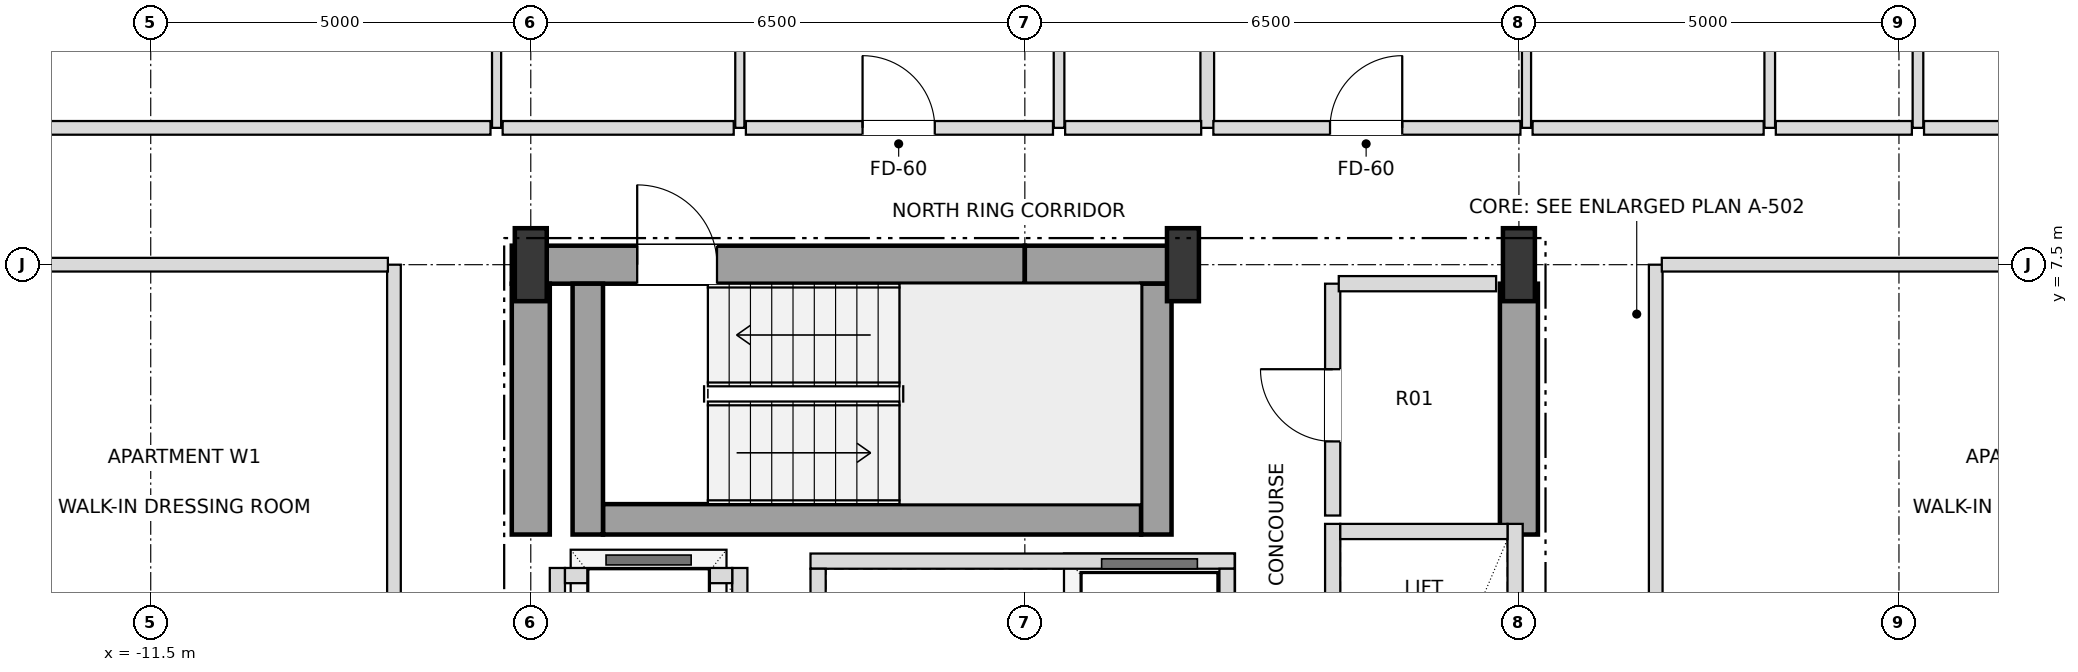
"""IFC4 building model, lengths in metres.
Left out: names, types, materials, properties, quantities, classifications, styles, units other than length and angle.
Written with IfcOpenShell. Run it as: python <this file> out.ifc"""

import sys

from ifc_helpers import new_model, si_unit, direction, frame, frame_2d, origin, origin_2d, place, context, subcontext, project, spatial, rectangle, i_section, extrude, element, fill, save


model = new_model("IFC4")
c1 = context("Model", 3, precision=1e-05, world=origin(), true_north=direction((0.0, 1.0)))
c2 = subcontext(c1, "Body", "Model", "MODEL_VIEW")
j1 = project(units=[si_unit("LENGTHUNIT", "METRE"), si_unit("PLANEANGLEUNIT", "RADIAN")], contexts=[c1])
p1 = place(None, origin())
s1 = spatial("IfcSite", under=j1, at=p1, CompositionType="ELEMENT")
p2 = place(p1, origin())
s2 = spatial("IfcBuilding", under=s1, at=p2, CompositionType="ELEMENT")
p3 = place(p2, frame((0.0, 0.0, 64.8)))
s3 = spatial("IfcBuildingStorey", under=s2, at=p3, CompositionType="ELEMENT", Elevation=64.8)
for number, where, z_axis, x_axis in (
    (1, (-6.5, 7.5, 0.0), (0.0, 0.0, 1.0), (1.0, 0.0, 0.0)),
    (2, (2.08, 7.5, 0.0), (0.0, 0.0, 1.0), (1.0, 0.0, 0.0)),
    (3, (6.5, 7.5, 0.0), (0.0, 0.0, 1.0), (1.0, 0.0, 0.0)),
):
    element("IfcColumn", number, at=place(p3, frame(where, z_axis=z_axis, x_axis=x_axis)), inside=s3, PredefinedType="COLUMN", context=c2, shape_type="SweptSolid", body=[
        extrude(i_section(OverallWidth=0.42, OverallDepth=0.96, WebThickness=0.022, FlangeThickness=0.034, at=origin_2d()), origin(), (0.0, 0.0, 1.0), 3.6),
    ])
p4 = place(p3, frame((-6.75, 7.5, 0.0), z_axis=(0.0, 0.0, 1.0), x_axis=(1.0, 0.0, 0.0)))
e4 = element("IfcWall", 4, at=p4, inside=s3, PredefinedType="SHEAR", context=c2, shape_type="SweptSolid", body=[
    extrude(rectangle(XDim=6.75, YDim=0.5, at=frame_2d((3.375, 0.0))), origin(), (0.0, 0.0, 1.0), 3.38),
])
p5 = place(p4, frame((1.65, 0.0, 0.0)))
e5 = element("IfcOpeningElement", 5, at=p5, cuts=e4, PredefinedType="OPENING", context=c2, shape_type="SweptSolid", body=[
    extrude(rectangle(XDim=1.05, YDim=2.15, at=frame_2d((0.525, 1.075))), frame((0.0, 0.26, 0.0), z_axis=(0.0, -1.0, 0.0), x_axis=(1.0, 0.0, 0.0)), (0.0, 0.0, 1.0), 0.52),
])
p6 = place(p3, frame((0.0, 7.5, 0.0), z_axis=(0.0, 0.0, 1.0), x_axis=(1.0, 0.0, 0.0)))
e6 = element("IfcWall", 6, at=p6, inside=s3, PredefinedType="SHEAR", context=c2, shape_type="SweptSolid", body=[
    extrude(rectangle(XDim=2.08, YDim=0.5, at=frame_2d((1.04, 0.0))), origin(), (0.0, 0.0, 1.0), 3.38),
])
for number, where, z_axis, x_axis in (
    (7, (-6.5, 3.95, 0.0), (0.0, 0.0, 1.0), (0.0, 1.0, 0.0)),
    (8, (6.5, 3.95, 0.0), (0.0, 0.0, 1.0), (0.0, 1.0, 0.0)),
):
    element("IfcWall", number, at=place(p3, frame(where, z_axis=z_axis, x_axis=x_axis)), inside=s3, PredefinedType="SHEAR", context=c2, shape_type="SweptSolid", body=[
        extrude(rectangle(XDim=3.3, YDim=0.5, at=frame_2d((1.65, 0.0))), origin(), (0.0, 0.0, 1.0), 3.38),
    ])
p7 = place(p3, frame((-5.55, 4.15, 0.0), z_axis=(0.0, 0.0, 1.0), x_axis=(1.0, 0.0, 0.0)))
e9 = element("IfcWall", 9, at=p7, inside=s3, PredefinedType="SHEAR", context=c2, shape_type="SweptSolid", body=[
    extrude(rectangle(XDim=7.08, YDim=0.4, at=frame_2d((3.54, 0.0))), origin(), (0.0, 0.0, 1.0), 3.38),
])
for number, where, z_axis, x_axis in (
    (10, (1.73, 3.95, 0.0), (0.0, 0.0, 1.0), (0.0, 1.0, 0.0)),
    (11, (-5.75, 3.95, 0.0), (0.0, 0.0, 1.0), (0.0, 1.0, 0.0)),
):
    element("IfcWall", number, at=place(p3, frame(where, z_axis=z_axis, x_axis=x_axis)), inside=s3, PredefinedType="SHEAR", context=c2, shape_type="SweptSolid", body=[
        extrude(rectangle(XDim=3.3, YDim=0.4, at=frame_2d((1.65, 0.0))), origin(), (0.0, 0.0, 1.0), 3.38),
    ])
p8 = place(p3, frame((-3.75, -3.51, 0.0), z_axis=(0.0, 0.0, 1.0), x_axis=(0.0, 1.0, 0.0)))
e12 = element("IfcWall", 12, at=p8, inside=s3, PredefinedType="SOLIDWALL", context=c2, shape_type="SweptSolid", body=[
    extrude(rectangle(XDim=7.02, YDim=0.2, at=frame_2d((3.51, 0.0))), origin(), (0.0, 0.0, 1.0), 3.38),
])
p9 = place(p8, frame((0.51, 0.0, 0.0)))
e13 = element("IfcOpeningElement", 13, at=p9, cuts=e12, PredefinedType="OPENING", context=c2, shape_type="SweptSolid", body=[
    extrude(rectangle(XDim=1.1, YDim=2.15, at=frame_2d((0.55, 1.075))), frame((0.0, 0.11, 0.0), z_axis=(0.0, -1.0, 0.0), x_axis=(1.0, 0.0, 0.0)), (0.0, 0.0, 1.0), 0.22),
])
p10 = place(p8, frame((2.96, 0.0, 0.0)))
e14 = element("IfcOpeningElement", 14, at=p10, cuts=e12, PredefinedType="OPENING", context=c2, shape_type="SweptSolid", body=[
    extrude(rectangle(XDim=1.1, YDim=2.15, at=frame_2d((0.55, 1.075))), frame((0.0, 0.11, 0.0), z_axis=(0.0, -1.0, 0.0), x_axis=(1.0, 0.0, 0.0)), (0.0, 0.0, 1.0), 0.22),
])
p11 = place(p8, frame((5.41, 0.0, 0.0)))
e15 = element("IfcOpeningElement", 15, at=p11, cuts=e12, PredefinedType="OPENING", context=c2, shape_type="SweptSolid", body=[
    extrude(rectangle(XDim=1.1, YDim=2.15, at=frame_2d((0.55, 1.075))), frame((0.0, 0.11, 0.0), z_axis=(0.0, -1.0, 0.0), x_axis=(1.0, 0.0, 0.0)), (0.0, 0.0, 1.0), 0.22),
])
p12 = place(p3, frame((-6.15, -3.51, 0.0), z_axis=(0.0, 0.0, 1.0), x_axis=(0.0, 1.0, 0.0)))
e16 = element("IfcWall", 16, at=p12, inside=s3, PredefinedType="SOLIDWALL", context=c2, shape_type="SweptSolid", body=[
    extrude(rectangle(XDim=7.02, YDim=0.2, at=frame_2d((3.51, 0.0))), origin(), (0.0, 0.0, 1.0), 3.38),
])
p13 = place(p3, frame((-6.05, 3.41, 0.0), z_axis=(0.0, 0.0, 1.0), x_axis=(1.0, 0.0, 0.0)))
e17 = element("IfcWall", 17, at=p13, inside=s3, PredefinedType="SOLIDWALL", context=c2, shape_type="SweptSolid", body=[
    extrude(rectangle(XDim=2.2, YDim=0.2, at=frame_2d((1.1, 0.0))), origin(), (0.0, 0.0, 1.0), 3.38),
])
p14 = place(p3, frame((4.05, -1.49, 0.0), z_axis=(0.0, 0.0, 1.0), x_axis=(0.0, 1.0, 0.0)))
e18 = element("IfcWall", 18, at=p14, inside=s3, PredefinedType="SOLIDWALL", context=c2, shape_type="SweptSolid", body=[
    extrude(rectangle(XDim=5.58, YDim=0.2, at=frame_2d((2.79, 0.0))), origin(), (0.0, 0.0, 1.0), 3.38),
])
p15 = place(p3, frame((6.45, -1.49, 0.0), z_axis=(0.0, 0.0, 1.0), x_axis=(0.0, 1.0, 0.0)))
e19 = element("IfcWall", 19, at=p15, inside=s3, PredefinedType="SOLIDWALL", context=c2, shape_type="SweptSolid", body=[
    extrude(rectangle(XDim=5.58, YDim=0.2, at=frame_2d((2.79, 0.0))), origin(), (0.0, 0.0, 1.0), 2.816),
])
p16 = place(p3, frame((4.15, 3.99, 0.0), z_axis=(0.0, 0.0, 1.0), x_axis=(1.0, 0.0, 0.0)))
e20 = element("IfcWall", 20, at=p16, inside=s3, PredefinedType="SOLIDWALL", context=c2, shape_type="SweptSolid", body=[
    extrude(rectangle(XDim=2.2, YDim=0.2, at=frame_2d((1.1, 0.0))), origin(), (0.0, 0.0, 1.0), 3.38),
])
p17 = place(p3, frame((-2.82, 3.6, 0.0), z_axis=(0.0, 0.0, 1.0), x_axis=(1.0, 0.0, 0.0)))
e21 = element("IfcWall", 21, at=p17, inside=s3, PredefinedType="SOLIDWALL", context=c2, shape_type="SweptSolid", body=[
    extrude(rectangle(XDim=5.58, YDim=0.2, at=frame_2d((2.79, 0.0))), origin(), (0.0, 0.0, 1.0), 3.38),
])
for number, where, z_axis, x_axis in (
    (22, (-2.72, 1.0, 0.0), (0.0, 0.0, 1.0), (0.0, 1.0, 0.0)),
    (23, (2.66, 1.0, 0.0), (0.0, 0.0, 1.0), (0.0, 1.0, 0.0)),
):
    element("IfcWall", number, at=place(p3, frame(where, z_axis=z_axis, x_axis=x_axis)), inside=s3, PredefinedType="SOLIDWALL", context=c2, shape_type="SweptSolid", body=[
        extrude(rectangle(XDim=2.5, YDim=0.2, at=frame_2d((1.25, 0.0))), origin(), (0.0, 0.0, 1.0), 3.38),
    ])
p18 = place(p3, frame((-8.3, -7.5, 0.0), z_axis=(0.0, 0.0, 1.0), x_axis=(0.0, 1.0, 0.0)))
e24 = element("IfcWall", 24, at=p18, inside=s3, PredefinedType="PARTITIONING", context=c2, shape_type="SweptSolid", body=[
    extrude(rectangle(XDim=15.0, YDim=0.18, at=frame_2d((7.5, 0.0))), origin(), (0.0, 0.0, 1.0), 3.38),
])
p19 = place(p18, frame((3.475, 0.0, 0.0)))
e25 = element("IfcOpeningElement", 25, at=p19, cuts=e24, PredefinedType="OPENING", context=c2, shape_type="SweptSolid", body=[
    extrude(rectangle(XDim=0.95, YDim=2.15, at=frame_2d((0.475, 1.075))), frame((0.0, 0.1, 0.0), z_axis=(0.0, -1.0, 0.0), x_axis=(1.0, 0.0, 0.0)), (0.0, 0.0, 1.0), 0.2),
])
p20 = place(p3, frame((-6.95, 9.3, 0.0), z_axis=(0.0, 0.0, 1.0), x_axis=(0.0, 1.0, 0.0)))
e26 = element("IfcWall", 26, at=p20, inside=s3, PredefinedType="PARTITIONING", context=c2, shape_type="SweptSolid", body=[
    extrude(rectangle(XDim=9.6, YDim=0.12, at=frame_2d((4.8, 0.0))), origin(), (0.0, 0.0, 1.0), 2.816),
])
p21 = place(p20, frame((4.35, 0.0, 0.0)))
e27 = element("IfcOpeningElement", 27, at=p21, cuts=e26, PredefinedType="OPENING", context=c2, shape_type="SweptSolid", body=[
    extrude(rectangle(XDim=0.9, YDim=2.1, at=frame_2d((0.45, 1.05))), frame((0.0, 0.07, 0.0), z_axis=(0.0, -1.0, 0.0), x_axis=(1.0, 0.0, 0.0)), (0.0, 0.0, 1.0), 0.14),
])
p22 = place(p3, frame((-3.75, 9.3, 0.0), z_axis=(0.0, 0.0, 1.0), x_axis=(0.0, 1.0, 0.0)))
e28 = element("IfcWall", 28, at=p22, inside=s3, PredefinedType="PARTITIONING", context=c2, shape_type="SweptSolid", body=[
    extrude(rectangle(XDim=15.6, YDim=0.12, at=frame_2d((7.8, 0.0))), origin(), (0.0, 0.0, 1.0), 2.816),
])
p23 = place(p22, frame((4.325, 0.0, 0.0)))
e29 = element("IfcOpeningElement", 29, at=p23, cuts=e28, PredefinedType="OPENING", context=c2, shape_type="SweptSolid", body=[
    extrude(rectangle(XDim=0.95, YDim=2.1, at=frame_2d((0.475, 1.05))), frame((0.0, 0.07, 0.0), z_axis=(0.0, -1.0, 0.0), x_axis=(1.0, 0.0, 0.0)), (0.0, 0.0, 1.0), 0.14),
])
p24 = place(p22, frame((12.15, 0.0, 0.0)))
e30 = element("IfcOpeningElement", 30, at=p24, cuts=e28, PredefinedType="OPENING", context=c2, shape_type="SweptSolid", body=[
    extrude(rectangle(XDim=0.9, YDim=2.1, at=frame_2d((0.45, 1.05))), frame((0.0, 0.07, 0.0), z_axis=(0.0, -1.0, 0.0), x_axis=(1.0, 0.0, 0.0)), (0.0, 0.0, 1.0), 0.14),
])
p25 = place(p3, frame((0.45, 9.3, 0.0), z_axis=(0.0, 0.0, 1.0), x_axis=(0.0, 1.0, 0.0)))
e31 = element("IfcWall", 31, at=p25, inside=s3, PredefinedType="PARTITIONING", context=c2, shape_type="SweptSolid", body=[
    extrude(rectangle(XDim=9.6, YDim=0.14, at=frame_2d((4.8, 0.0))), origin(), (0.0, 0.0, 1.0), 2.948),
])
p26 = place(p25, frame((4.35, 0.0, 0.0)))
e32 = element("IfcOpeningElement", 32, at=p26, cuts=e31, PredefinedType="OPENING", context=c2, shape_type="SweptSolid", body=[
    extrude(rectangle(XDim=0.9, YDim=2.1, at=frame_2d((0.45, 1.05))), frame((0.0, 0.08, 0.0), z_axis=(0.0, -1.0, 0.0), x_axis=(1.0, 0.0, 0.0)), (0.0, 0.0, 1.0), 0.16),
])
p27 = place(p3, frame((2.4, 9.3, 0.0), z_axis=(0.0, 0.0, 1.0), x_axis=(0.0, 1.0, 0.0)))
e33 = element("IfcWall", 33, at=p27, inside=s3, PredefinedType="PARTITIONING", context=c2, shape_type="SweptSolid", body=[
    extrude(rectangle(XDim=15.6, YDim=0.18, at=frame_2d((7.8, 0.0))), origin(), (0.0, 0.0, 1.0), 2.816),
])
p28 = place(p3, frame((4.05, 4.2, 0.0), z_axis=(0.0, 0.0, 1.0), x_axis=(0.0, 1.0, 0.0)))
e34 = element("IfcWall", 34, at=p28, inside=s3, PredefinedType="SOLIDWALL", context=c2, shape_type="SweptSolid", body=[
    extrude(rectangle(XDim=3.05, YDim=0.2, at=frame_2d((1.525, 0.0))), origin(), (0.0, 0.0, 1.0), 3.38),
])
p29 = place(p28, frame((0.975, 0.0, 0.0)))
e35 = element("IfcOpeningElement", 35, at=p29, cuts=e34, PredefinedType="OPENING", context=c2, shape_type="SweptSolid", body=[
    extrude(rectangle(XDim=0.95, YDim=2.15, at=frame_2d((0.475, 1.075))), frame((0.0, 0.11, 0.0), z_axis=(0.0, -1.0, 0.0), x_axis=(1.0, 0.0, 0.0)), (0.0, 0.0, 1.0), 0.22),
])
p30 = place(p3, frame((6.6, 9.3, 0.0), z_axis=(0.0, 0.0, 1.0), x_axis=(0.0, 1.0, 0.0)))
e36 = element("IfcWall", 36, at=p30, inside=s3, PredefinedType="PARTITIONING", context=c2, shape_type="SweptSolid", body=[
    extrude(rectangle(XDim=9.6, YDim=0.12, at=frame_2d((4.8, 0.0))), origin(), (0.0, 0.0, 1.0), 2.816),
])
p31 = place(p30, frame((4.325, 0.0, 0.0)))
e37 = element("IfcOpeningElement", 37, at=p31, cuts=e36, PredefinedType="OPENING", context=c2, shape_type="SweptSolid", body=[
    extrude(rectangle(XDim=0.95, YDim=2.1, at=frame_2d((0.475, 1.05))), frame((0.0, 0.07, 0.0), z_axis=(0.0, -1.0, 0.0), x_axis=(1.0, 0.0, 0.0)), (0.0, 0.0, 1.0), 0.14),
])
p32 = place(p3, frame((8.3, -7.5, 0.0), z_axis=(0.0, 0.0, 1.0), x_axis=(0.0, 1.0, 0.0)))
e38 = element("IfcWall", 38, at=p32, inside=s3, PredefinedType="PARTITIONING", context=c2, shape_type="SweptSolid", body=[
    extrude(rectangle(XDim=15.0, YDim=0.18, at=frame_2d((7.5, 0.0))), origin(), (0.0, 0.0, 1.0), 3.38),
])
p33 = place(p32, frame((3.475, 0.0, 0.0)))
e39 = element("IfcOpeningElement", 39, at=p33, cuts=e38, PredefinedType="OPENING", context=c2, shape_type="SweptSolid", body=[
    extrude(rectangle(XDim=0.95, YDim=2.15, at=frame_2d((0.475, 1.075))), frame((0.0, 0.1, 0.0), z_axis=(0.0, -1.0, 0.0), x_axis=(1.0, 0.0, 0.0)), (0.0, 0.0, 1.0), 0.2),
])
p34 = place(p3, frame((9.8, 9.3, 0.0), z_axis=(0.0, 0.0, 1.0), x_axis=(0.0, 1.0, 0.0)))
e40 = element("IfcWall", 40, at=p34, inside=s3, PredefinedType="PARTITIONING", context=c2, shape_type="SweptSolid", body=[
    extrude(rectangle(XDim=9.6, YDim=0.14, at=frame_2d((4.8, 0.0))), origin(), (0.0, 0.0, 1.0), 2.816),
])
p35 = place(p34, frame((4.35, 0.0, 0.0)))
e41 = element("IfcOpeningElement", 41, at=p35, cuts=e40, PredefinedType="OPENING", context=c2, shape_type="SweptSolid", body=[
    extrude(rectangle(XDim=0.9, YDim=2.1, at=frame_2d((0.45, 1.05))), frame((0.0, 0.08, 0.0), z_axis=(0.0, -1.0, 0.0), x_axis=(1.0, 0.0, 0.0)), (0.0, 0.0, 1.0), 0.16),
])
p36 = place(p3, frame((11.75, 9.3, 0.0), z_axis=(0.0, 0.0, 1.0), x_axis=(0.0, 1.0, 0.0)))
e42 = element("IfcWall", 42, at=p36, inside=s3, PredefinedType="PARTITIONING", context=c2, shape_type="SweptSolid", body=[
    extrude(rectangle(XDim=15.6, YDim=0.14, at=frame_2d((7.8, 0.0))), origin(), (0.0, 0.0, 1.0), 2.736),
])
p37 = place(p36, frame((12.15, 0.0, 0.0)))
e43 = element("IfcOpeningElement", 43, at=p37, cuts=e42, PredefinedType="OPENING", context=c2, shape_type="SweptSolid", body=[
    extrude(rectangle(XDim=0.9, YDim=2.1, at=frame_2d((0.45, 1.05))), frame((0.0, 0.08, 0.0), z_axis=(0.0, -1.0, 0.0), x_axis=(1.0, 0.0, 0.0)), (0.0, 0.0, 1.0), 0.16),
])
p38 = place(p3, frame((4.13, 7.25, 0.0), z_axis=(0.0, 0.0, 1.0), x_axis=(1.0, 0.0, 0.0)))
e44 = element("IfcWall", 44, at=p38, inside=s3, PredefinedType="SOLIDWALL", context=c2, shape_type="SweptSolid", body=[
    extrude(rectangle(XDim=2.07, YDim=0.2, at=frame_2d((1.035, 0.0))), origin(), (0.0, 0.0, 1.0), 3.38),
])
for number, where, z_axis, x_axis in (
    (45, (-16.02, 7.5, 0.0), (0.0, 0.0, 1.0), (1.0, 0.0, 0.0)),
    (46, (8.38, 7.5, 0.0), (0.0, 0.0, 1.0), (1.0, 0.0, 0.0)),
):
    element("IfcWall", number, at=place(p3, frame(where, z_axis=z_axis, x_axis=x_axis)), inside=s3, PredefinedType="PARTITIONING", context=c2, shape_type="SweptSolid", body=[
        extrude(rectangle(XDim=7.64, YDim=0.18, at=frame_2d((3.82, 0.0))), origin(), (0.0, 0.0, 1.0), 2.816),
    ])
p39 = place(p3, frame((-18.32, 9.3, 0.0), z_axis=(0.0, 0.0, 1.0), x_axis=(1.0, 0.0, 0.0)))
e47 = element("IfcWall", 47, at=p39, inside=s3, PredefinedType="PARTITIONING", context=c2, shape_type="SweptSolid", body=[
    extrude(rectangle(XDim=11.29, YDim=0.18, at=frame_2d((5.645, 0.0))), origin(), (0.0, 0.0, 1.0), 2.816),
])
p40 = place(p3, frame((-6.87, 9.3, 0.0), z_axis=(0.0, 0.0, 1.0), x_axis=(1.0, 0.0, 0.0)))
e48 = element("IfcWall", 48, at=p40, inside=s3, PredefinedType="PARTITIONING", context=c2, shape_type="SweptSolid", body=[
    extrude(rectangle(XDim=3.04, YDim=0.18, at=frame_2d((1.52, 0.0))), origin(), (0.0, 0.0, 1.0), 2.816),
])
p41 = place(p3, frame((-3.67, 9.3, 0.0), z_axis=(0.0, 0.0, 1.0), x_axis=(1.0, 0.0, 0.0)))
e49 = element("IfcWall", 49, at=p41, inside=s3, PredefinedType="PARTITIONING", context=c2, shape_type="SweptSolid", body=[
    extrude(rectangle(XDim=4.04, YDim=0.18, at=frame_2d((2.02, 0.0))), origin(), (0.0, 0.0, 1.0), 3.38),
])
p42 = place(p41, frame((1.535, 0.0, 0.0)))
e50 = element("IfcOpeningElement", 50, at=p42, cuts=e49, PredefinedType="OPENING", context=c2, shape_type="SweptSolid", body=[
    extrude(rectangle(XDim=0.95, YDim=2.15, at=frame_2d((0.475, 1.075))), frame((0.0, 0.1, 0.0), z_axis=(0.0, -1.0, 0.0), x_axis=(1.0, 0.0, 0.0)), (0.0, 0.0, 1.0), 0.2),
])
p43 = place(p3, frame((0.53, 9.3, 0.0), z_axis=(0.0, 0.0, 1.0), x_axis=(1.0, 0.0, 0.0)))
e51 = element("IfcWall", 51, at=p43, inside=s3, PredefinedType="PARTITIONING", context=c2, shape_type="SweptSolid", body=[
    extrude(rectangle(XDim=1.79, YDim=0.18, at=frame_2d((0.895, 0.0))), origin(), (0.0, 0.0, 1.0), 3.38),
])
p44 = place(p3, frame((2.48, 9.3, 0.0), z_axis=(0.0, 0.0, 1.0), x_axis=(1.0, 0.0, 0.0)))
e52 = element("IfcWall", 52, at=p44, inside=s3, PredefinedType="PARTITIONING", context=c2, shape_type="SweptSolid", body=[
    extrude(rectangle(XDim=4.04, YDim=0.18, at=frame_2d((2.02, 0.0))), origin(), (0.0, 0.0, 1.0), 3.38),
])
p45 = place(p44, frame((1.535, 0.0, 0.0)))
e53 = element("IfcOpeningElement", 53, at=p45, cuts=e52, PredefinedType="OPENING", context=c2, shape_type="SweptSolid", body=[
    extrude(rectangle(XDim=0.95, YDim=2.15, at=frame_2d((0.475, 1.075))), frame((0.0, 0.1, 0.0), z_axis=(0.0, -1.0, 0.0), x_axis=(1.0, 0.0, 0.0)), (0.0, 0.0, 1.0), 0.2),
])
p46 = place(p3, frame((6.68, 9.3, 0.0), z_axis=(0.0, 0.0, 1.0), x_axis=(1.0, 0.0, 0.0)))
e54 = element("IfcWall", 54, at=p46, inside=s3, PredefinedType="PARTITIONING", context=c2, shape_type="SweptSolid", body=[
    extrude(rectangle(XDim=3.04, YDim=0.18, at=frame_2d((1.52, 0.0))), origin(), (0.0, 0.0, 1.0), 3.38),
])
p47 = place(p3, frame((9.88, 9.3, 0.0), z_axis=(0.0, 0.0, 1.0), x_axis=(1.0, 0.0, 0.0)))
e55 = element("IfcWall", 55, at=p47, inside=s3, PredefinedType="PARTITIONING", context=c2, shape_type="SweptSolid", body=[
    extrude(rectangle(XDim=1.79, YDim=0.18, at=frame_2d((0.895, 0.0))), origin(), (0.0, 0.0, 1.0), 3.38),
])
p48 = place(p3, frame((11.83, 9.3, 0.0), z_axis=(0.0, 0.0, 1.0), x_axis=(1.0, 0.0, 0.0)))
e56 = element("IfcWall", 56, at=p48, inside=s3, PredefinedType="PARTITIONING", context=c2, shape_type="SweptSolid", body=[
    extrude(rectangle(XDim=6.49, YDim=0.18, at=frame_2d((3.245, 0.0))), origin(), (0.0, 0.0, 1.0), 2.816),
])
p49 = place(p5, origin())
e57 = element("IfcDoor", 57, at=p49, inside=s3, OperationType="SINGLE_SWING_LEFT", PredefinedType="DOOR", context=c2, shape_type="SweptSolid", body=[
    extrude(rectangle(XDim=1.05, YDim=2.15, at=frame_2d((0.525, 1.075))), frame((0.0, 0.025, 0.0), z_axis=(0.0, -1.0, 0.0), x_axis=(1.0, 0.0, 0.0)), (0.0, 0.0, 1.0), 0.05),
])
fill(e5, e57)
p50 = place(p29, origin())
e58 = element("IfcDoor", 58, at=p50, inside=s3, OperationType="SINGLE_SWING_RIGHT", PredefinedType="DOOR", context=c2, shape_type="SweptSolid", body=[
    extrude(rectangle(XDim=0.95, YDim=2.15, at=frame_2d((0.475, 1.075))), frame((0.0, 0.025, 0.0), z_axis=(0.0, -1.0, 0.0), x_axis=(1.0, 0.0, 0.0)), (0.0, 0.0, 1.0), 0.05),
])
fill(e35, e58)
p51 = place(p42, origin())
e59 = element("IfcDoor", 59, at=p51, inside=s3, OperationType="SINGLE_SWING_LEFT", PredefinedType="DOOR", context=c2, shape_type="SweptSolid", body=[
    extrude(rectangle(XDim=0.95, YDim=2.15, at=frame_2d((0.475, 1.075))), frame((0.0, 0.025, 0.0), z_axis=(0.0, -1.0, 0.0), x_axis=(1.0, 0.0, 0.0)), (0.0, 0.0, 1.0), 0.05),
])
fill(e50, e59)
p52 = place(p45, origin())
e60 = element("IfcDoor", 60, at=p52, inside=s3, OperationType="SINGLE_SWING_RIGHT", PredefinedType="DOOR", context=c2, shape_type="SweptSolid", body=[
    extrude(rectangle(XDim=0.95, YDim=2.15, at=frame_2d((0.475, 1.075))), frame((0.0, 0.025, 0.0), z_axis=(0.0, -1.0, 0.0), x_axis=(1.0, 0.0, 0.0)), (0.0, 0.0, 1.0), 0.05),
])
fill(e53, e60)
save(model, sys.argv[1])
